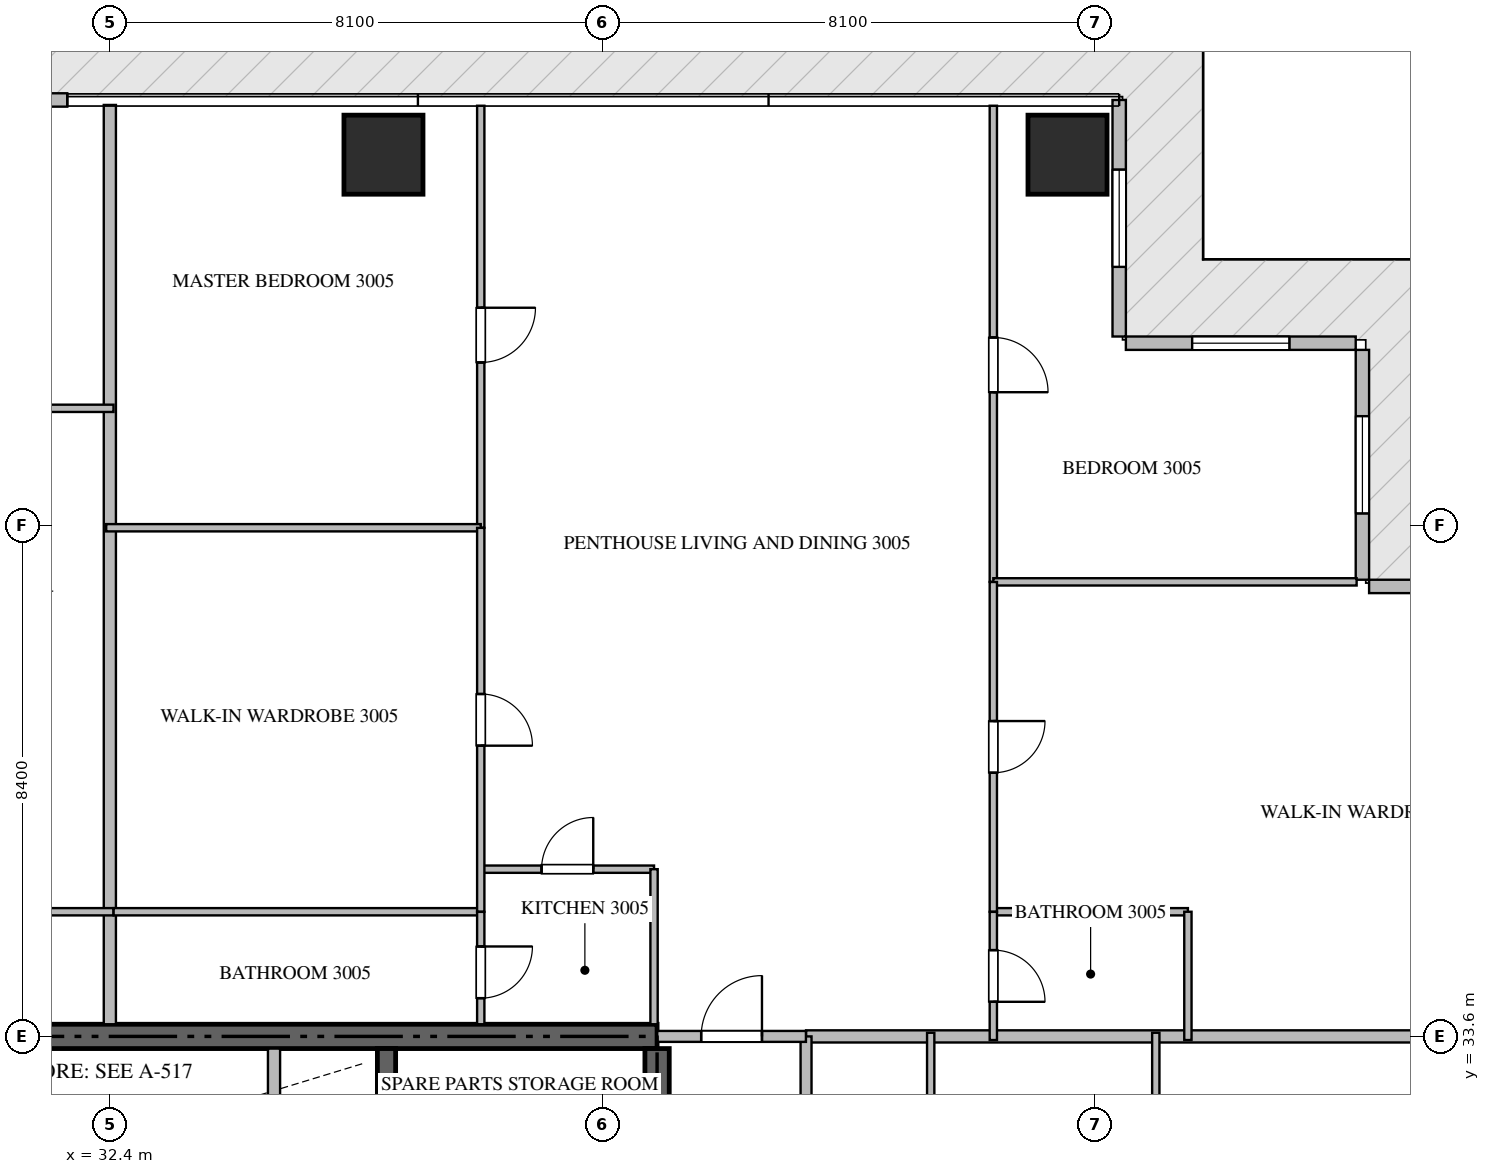
"""IFC4 building model, lengths in metres.
Left out: names, types, materials, properties, quantities, classifications, styles, units other than length and angle.
Written with IfcOpenShell. Run it as: python <this file> out.ifc"""

import sys

from ifc_helpers import new_model, si_unit, direction, frame, frame_2d, origin, origin_2d, place, context, subcontext, project, spatial, rectangle, extrude, source, transform, mapped, element, fill, save


model = new_model("IFC4")
c1 = context("Model", 3, precision=1e-05, world=origin(), true_north=direction((0.0, 1.0)))
c2 = subcontext(c1, "Body", "Model", "MODEL_VIEW")
j1 = project(units=[si_unit("LENGTHUNIT", "METRE"), si_unit("PLANEANGLEUNIT", "RADIAN")], contexts=[c1])
p1 = place(None, origin())
s1 = spatial("IfcSite", under=j1, at=p1, CompositionType="ELEMENT")
p2 = place(p1, origin())
s2 = spatial("IfcBuilding", under=s1, at=p2, CompositionType="ELEMENT")
p3 = place(p2, frame((0.0, 0.0, 123.9)))
s3 = spatial("IfcBuildingStorey", under=s2, at=p3, CompositionType="ELEMENT", Elevation=123.9)
p4 = place(p3, frame((41.4, 33.6, -0.26), z_axis=(0.0, 0.0, 1.0), x_axis=(-1.0, 0.0, 0.0)))
e1 = element("IfcWall", 1, at=p4, inside=s3, PredefinedType="SHEAR", context=c2, shape_type="SweptSolid", body=[
    extrude(rectangle(XDim=18.0, YDim=0.4, at=frame_2d((9.0, 0.0))), origin(), (0.0, 0.0, 1.0), 3.748),
])
p5 = place(p3, frame((41.4, 27.75, -0.26), z_axis=(0.0, 0.0, 1.0), x_axis=(0.0, 1.0, 0.0)))
e2 = element("IfcWall", 2, at=p5, inside=s3, PredefinedType="SHEAR", context=c2, shape_type="SweptSolid", body=[
    extrude(rectangle(XDim=5.65, YDim=0.4, at=frame_2d((2.825, 0.0))), origin(), (0.0, 0.0, 1.0), 3.748),
])
p6 = place(p3, frame((36.95, 27.05, -0.26), z_axis=(0.0, 0.0, 1.0), x_axis=(0.0, 1.0, 0.0)))
e3 = element("IfcWall", 3, at=p6, inside=s3, PredefinedType="SHEAR", context=c2, shape_type="SweptSolid", body=[
    extrude(rectangle(XDim=6.35, YDim=0.3, at=frame_2d((3.175, 0.0))), origin(), (0.0, 0.0, 1.0), 3.748),
])
m1 = source(origin(), c2, "Body", "SweptSolid", [
    extrude(rectangle(XDim=1.3, YDim=1.3, at=origin_2d()), origin(), (0.0, 0.0, 1.0), 3.75),
])
for number, where, z_axis, x_axis in (
    (4, (36.9, 48.1, -0.26), (0.0, 0.0, 1.0), (1.0, 0.0, 0.0)),
    (5, (48.15, 48.1, -0.26), (0.0, 0.0, 1.0), (1.0, 0.0, 0.0)),
):
    element("IfcColumn", number, at=place(p3, frame(where, z_axis=z_axis, x_axis=x_axis)), inside=s3, PredefinedType="COLUMN", context=c2, shape_type="MappedRepresentation", body=[
        mapped(m1, transform((0.0, 0.0, 0.0), scale=1.0)),
    ])
p7 = place(p3, frame((57.0, 41.0, 0.0), z_axis=(0.0, 0.0, 1.0), x_axis=(-1.0, 0.0, 0.0)))
e6 = element("IfcWall", 6, at=p7, inside=s3, PredefinedType="ELEMENTEDWALL", context=c2, shape_type="SweptSolid", body=[
    extrude(rectangle(XDim=3.89, YDim=0.22, at=frame_2d((1.945, 0.0))), origin(), (0.0, 0.0, 1.0), 3.475),
])
p8 = place(p7, frame((1.145, 0.0, 0.65)))
e7 = element("IfcOpeningElement", 7, at=p8, cuts=e6, PredefinedType="OPENING", context=c2, shape_type="SweptSolid", body=[
    extrude(rectangle(XDim=1.6, YDim=2.1, at=frame_2d((0.8, 1.05))), frame((0.0, 0.12, 0.0), z_axis=(0.0, -1.0, 0.0), x_axis=(1.0, 0.0, 0.0)), (0.0, 0.0, 1.0), 0.24),
])
p9 = place(p3, frame((53.0, 41.11, 0.0), z_axis=(0.0, 0.0, 1.0), x_axis=(0.0, 1.0, 0.0)))
e8 = element("IfcWall", 8, at=p9, inside=s3, PredefinedType="ELEMENTEDWALL", context=c2, shape_type="SweptSolid", body=[
    extrude(rectangle(XDim=3.78, YDim=0.22, at=frame_2d((1.89, 0.0))), origin(), (0.0, 0.0, 1.0), 3.475),
])
p10 = place(p9, frame((1.09, 0.0, 0.65)))
e9 = element("IfcOpeningElement", 9, at=p10, cuts=e8, PredefinedType="OPENING", context=c2, shape_type="SweptSolid", body=[
    extrude(rectangle(XDim=1.6, YDim=2.1, at=frame_2d((0.8, 1.05))), frame((0.0, 0.12, 0.0), z_axis=(0.0, -1.0, 0.0), x_axis=(1.0, 0.0, 0.0)), (0.0, 0.0, 1.0), 0.24),
])
p11 = place(p3, frame((52.89, 45.0, 0.0), z_axis=(0.0, 0.0, 1.0), x_axis=(-1.0, 0.0, 0.0)))
e10 = element("IfcWall", 10, at=p11, inside=s3, PredefinedType="ELEMENTEDWALL", context=c2, shape_type="SweptSolid", body=[
    extrude(rectangle(XDim=3.78, YDim=0.22, at=frame_2d((1.89, 0.0))), origin(), (0.0, 0.0, 1.0), 3.475),
])
p12 = place(p11, frame((1.09, 0.0, 0.65)))
e11 = element("IfcOpeningElement", 11, at=p12, cuts=e10, PredefinedType="OPENING", context=c2, shape_type="SweptSolid", body=[
    extrude(rectangle(XDim=1.6, YDim=2.1, at=frame_2d((0.8, 1.05))), frame((0.0, 0.12, 0.0), z_axis=(0.0, -1.0, 0.0), x_axis=(1.0, 0.0, 0.0)), (0.0, 0.0, 1.0), 0.24),
])
p13 = place(p3, frame((49.0, 45.11, 0.0), z_axis=(0.0, 0.0, 1.0), x_axis=(0.0, 1.0, 0.0)))
e12 = element("IfcWall", 12, at=p13, inside=s3, PredefinedType="ELEMENTEDWALL", context=c2, shape_type="SweptSolid", body=[
    extrude(rectangle(XDim=3.89, YDim=0.22, at=frame_2d((1.945, 0.0))), origin(), (0.0, 0.0, 1.0), 3.475),
])
p14 = place(p13, frame((1.145, 0.0, 0.65)))
e13 = element("IfcOpeningElement", 13, at=p14, cuts=e12, PredefinedType="OPENING", context=c2, shape_type="SweptSolid", body=[
    extrude(rectangle(XDim=1.6, YDim=2.1, at=frame_2d((0.8, 1.05))), frame((0.0, 0.12, 0.0), z_axis=(0.0, -1.0, 0.0), x_axis=(1.0, 0.0, 0.0)), (0.0, 0.0, 1.0), 0.24),
])
p15 = place(p3, frame((31.7, 49.0, 0.0), z_axis=(0.0, 0.0, 1.0), x_axis=(-1.0, 0.0, 0.0)))
e14 = element("IfcWall", 14, at=p15, inside=s3, PredefinedType="ELEMENTEDWALL", context=c2, shape_type="SweptSolid", body=[
    extrude(rectangle(XDim=3.0, YDim=0.22, at=frame_2d((1.5, 0.0))), origin(), (0.0, 0.0, 1.0), 3.475),
])
p16 = place(p15, frame((0.95, 0.0, 0.0)))
e15 = element("IfcOpeningElement", 15, at=p16, cuts=e14, PredefinedType="OPENING", context=c2, shape_type="SweptSolid", body=[
    extrude(rectangle(XDim=1.1, YDim=2.2, at=frame_2d((0.55, 1.1))), frame((0.0, 0.12, 0.0), z_axis=(0.0, -1.0, 0.0), x_axis=(1.0, 0.0, 0.0)), (0.0, 0.0, 1.0), 0.24),
])
p17 = place(p3, frame((35.1, 30.75, 0.0), z_axis=(0.0, 0.0, 1.0), x_axis=(0.0, 1.0, 0.0)))
e16 = element("IfcWall", 16, at=p17, inside=s3, PredefinedType="STANDARD", context=c2, shape_type="SweptSolid", body=[
    extrude(rectangle(XDim=2.65, YDim=0.2, at=frame_2d((1.325, 0.0))), origin(), (0.0, 0.0, 1.0), 3.49),
])
p18 = place(p3, frame((32.4, 33.8, 0.0), z_axis=(0.0, 0.0, 1.0), x_axis=(0.0, 1.0, 0.0)))
e17 = element("IfcWall", 17, at=p18, inside=s3, PredefinedType="PARTITIONING", context=c2, shape_type="SweptSolid", body=[
    extrude(rectangle(XDim=15.118, YDim=0.2, at=frame_2d((7.559, 0.0))), origin(), (0.0, 0.0, 1.0), 3.49),
])
p19 = place(p3, frame((43.85, 33.6, 0.0), z_axis=(0.0, 0.0, 1.0), x_axis=(1.0, 0.0, 0.0)))
e18 = element("IfcWall", 18, at=p19, inside=s3, PredefinedType="PARTITIONING", context=c2, shape_type="SweptSolid", body=[
    extrude(rectangle(XDim=13.068, YDim=0.2, at=frame_2d((6.534, 0.0))), origin(), (0.0, 0.0, 1.0), 3.49),
])
p20 = place(p3, frame((43.85, 14.9, 0.0), z_axis=(0.0, 0.0, 1.0), x_axis=(0.0, 1.0, 0.0)))
e19 = element("IfcWall", 19, at=p20, inside=s3, PredefinedType="PARTITIONING", context=c2, shape_type="SweptSolid", body=[
    extrude(rectangle(XDim=18.7, YDim=0.18, at=frame_2d((9.35, 0.0))), origin(), (0.0, 0.0, 1.0), 3.49),
])
p21 = place(p20, frame((1.805, 0.0, 0.0)))
e20 = element("IfcOpeningElement", 20, at=p21, cuts=e19, PredefinedType="OPENING", context=c2, shape_type="SweptSolid", body=[
    extrude(rectangle(XDim=1.0, YDim=2.15, at=frame_2d((0.5, 1.075))), frame((0.0, 0.1, 0.0), z_axis=(0.0, -1.0, 0.0), x_axis=(1.0, 0.0, 0.0)), (0.0, 0.0, 1.0), 0.2),
])
p22 = place(p20, frame((10.602, 0.0, 0.0)))
e21 = element("IfcOpeningElement", 21, at=p22, cuts=e19, PredefinedType="OPENING", context=c2, shape_type="SweptSolid", body=[
    extrude(rectangle(XDim=1.0, YDim=2.15, at=frame_2d((0.5, 1.075))), frame((0.0, 0.1, 0.0), z_axis=(0.0, -1.0, 0.0), x_axis=(1.0, 0.0, 0.0)), (0.0, 0.0, 1.0), 0.2),
])
p23 = place(p3, frame((41.402, 33.6, 0.0), z_axis=(0.0, 0.0, 1.0), x_axis=(1.0, 0.0, 0.0)))
e22 = element("IfcWall", 22, at=p23, inside=s3, PredefinedType="PARTITIONING", context=c2, shape_type="SweptSolid", body=[
    extrude(rectangle(XDim=2.446, YDim=0.18, at=frame_2d((1.223, 0.0))), origin(), (0.0, 0.0, 1.0), 3.49),
])
p24 = place(p23, frame((0.723, 0.0, 0.0)))
e23 = element("IfcOpeningElement", 23, at=p24, cuts=e22, PredefinedType="OPENING", context=c2, shape_type="SweptSolid", body=[
    extrude(rectangle(XDim=1.0, YDim=2.15, at=frame_2d((0.5, 1.075))), frame((0.0, 0.1, 0.0), z_axis=(0.0, -1.0, 0.0), x_axis=(1.0, 0.0, 0.0)), (0.0, 0.0, 1.0), 0.2),
])
for number, where, z_axis, x_axis in (
    (24, (26.3, 43.929, 0.0), (0.0, 0.0, 1.0), (1.0, 0.0, 0.0)),
    (25, (26.3, 35.65, 0.0), (0.0, 0.0, 1.0), (1.0, 0.0, 0.0)),
):
    element("IfcWall", number, at=place(p3, frame(where, z_axis=z_axis, x_axis=x_axis)), inside=s3, PredefinedType="PARTITIONING", context=c2, shape_type="SweptSolid", body=[
        extrude(rectangle(XDim=6.16, YDim=0.12, at=frame_2d((3.08, 0.0))), origin(), (0.0, 0.0, 1.0), 3.49),
    ])
p25 = place(p3, frame((38.5, 36.35, 0.0), z_axis=(0.0, 0.0, 1.0), x_axis=(1.0, 0.0, 0.0)))
e26 = element("IfcWall", 26, at=p25, inside=s3, PredefinedType="PARTITIONING", context=c2, shape_type="SweptSolid", body=[
    extrude(rectangle(XDim=2.85, YDim=0.12, at=frame_2d((1.425, 0.0))), origin(), (0.0, 0.0, 1.0), 3.49),
])
p26 = place(p25, frame((1.0, 0.0, 0.0)))
e27 = element("IfcOpeningElement", 27, at=p26, cuts=e26, PredefinedType="OPENING", context=c2, shape_type="SweptSolid", body=[
    extrude(rectangle(XDim=0.85, YDim=2.1, at=frame_2d((0.425, 1.05))), frame((0.0, 0.07, 0.0), z_axis=(0.0, -1.0, 0.0), x_axis=(1.0, 0.0, 0.0)), (0.0, 0.0, 1.0), 0.14),
])
p27 = place(p3, frame((41.35, 36.35, 0.0), z_axis=(0.0, 0.0, 1.0), x_axis=(0.0, -1.0, 0.0)))
e28 = element("IfcWall", 28, at=p27, inside=s3, PredefinedType="PARTITIONING", context=c2, shape_type="SweptSolid", body=[
    extrude(rectangle(XDim=2.55, YDim=0.12, at=frame_2d((1.275, 0.0))), origin(), (0.0, 0.0, 1.0), 3.49),
])
p28 = place(p3, frame((38.5, 48.905, 0.0), z_axis=(0.0, 0.0, 1.0), x_axis=(0.0, -1.0, 0.0)))
e29 = element("IfcWall", 29, at=p28, inside=s3, PredefinedType="PARTITIONING", context=c2, shape_type="SweptSolid", body=[
    extrude(rectangle(XDim=6.94, YDim=0.12, at=frame_2d((3.47, 0.0))), origin(), (0.0, 0.0, 1.0), 3.49),
])
p29 = place(p28, frame((3.322, 0.0, 0.0)))
e30 = element("IfcOpeningElement", 30, at=p29, cuts=e29, PredefinedType="OPENING", context=c2, shape_type="SweptSolid", body=[
    extrude(rectangle(XDim=0.9, YDim=2.1, at=frame_2d((0.45, 1.05))), frame((0.0, 0.07, 0.0), z_axis=(0.0, -1.0, 0.0), x_axis=(1.0, 0.0, 0.0)), (0.0, 0.0, 1.0), 0.14),
])
p30 = place(p3, frame((32.34, 41.965, 0.0), z_axis=(0.0, 0.0, 1.0), x_axis=(1.0, 0.0, 0.0)))
e31 = element("IfcWall", 31, at=p30, inside=s3, PredefinedType="PARTITIONING", context=c2, shape_type="SweptSolid", body=[
    extrude(rectangle(XDim=6.16, YDim=0.12, at=frame_2d((3.08, 0.0))), origin(), (0.0, 0.0, 1.0), 3.49),
])
p31 = place(p3, frame((32.462, 35.65, 0.0), z_axis=(0.0, 0.0, 1.0), x_axis=(1.0, 0.0, 0.0)))
e32 = element("IfcWall", 32, at=p31, inside=s3, PredefinedType="PARTITIONING", context=c2, shape_type="SweptSolid", body=[
    extrude(rectangle(XDim=6.038, YDim=0.12, at=frame_2d((3.019, 0.0))), origin(), (0.0, 0.0, 1.0), 3.49),
])
p32 = place(p3, frame((38.5, 41.963, 0.0), z_axis=(0.0, 0.0, 1.0), x_axis=(0.0, -1.0, 0.0)))
e33 = element("IfcWall", 33, at=p32, inside=s3, PredefinedType="PARTITIONING", context=c2, shape_type="SweptSolid", body=[
    extrude(rectangle(XDim=6.313, YDim=0.12, at=frame_2d((3.156, 0.0))), origin(), (0.0, 0.0, 1.0), 3.49),
])
p33 = place(p32, frame((2.732, 0.0, 0.0)))
e34 = element("IfcOpeningElement", 34, at=p33, cuts=e33, PredefinedType="OPENING", context=c2, shape_type="SweptSolid", body=[
    extrude(rectangle(XDim=0.85, YDim=2.1, at=frame_2d((0.425, 1.05))), frame((0.0, 0.07, 0.0), z_axis=(0.0, -1.0, 0.0), x_axis=(1.0, 0.0, 0.0)), (0.0, 0.0, 1.0), 0.14),
])
p34 = place(p3, frame((38.5, 35.648, 0.0), z_axis=(0.0, 0.0, 1.0), x_axis=(0.0, -1.0, 0.0)))
e35 = element("IfcWall", 35, at=p34, inside=s3, PredefinedType="PARTITIONING", context=c2, shape_type="SweptSolid", body=[
    extrude(rectangle(XDim=1.848, YDim=0.12, at=frame_2d((0.924, 0.0))), origin(), (0.0, 0.0, 1.0), 3.49),
])
p35 = place(p34, frame((0.569, 0.0, 0.0)))
e36 = element("IfcOpeningElement", 36, at=p35, cuts=e35, PredefinedType="OPENING", context=c2, shape_type="SweptSolid", body=[
    extrude(rectangle(XDim=0.85, YDim=2.1, at=frame_2d((0.425, 1.05))), frame((0.0, 0.07, 0.0), z_axis=(0.0, -1.0, 0.0), x_axis=(1.0, 0.0, 0.0)), (0.0, 0.0, 1.0), 0.14),
])
p36 = place(p3, frame((46.93, 48.905, 0.0), z_axis=(0.0, 0.0, 1.0), x_axis=(0.0, -1.0, 0.0)))
e37 = element("IfcWall", 37, at=p36, inside=s3, PredefinedType="PARTITIONING", context=c2, shape_type="SweptSolid", body=[
    extrude(rectangle(XDim=7.83, YDim=0.12, at=frame_2d((3.915, 0.0))), origin(), (0.0, 0.0, 1.0), 3.49),
])
p37 = place(p36, frame((3.811, 0.0, 0.0)))
e38 = element("IfcOpeningElement", 38, at=p37, cuts=e37, PredefinedType="OPENING", context=c2, shape_type="SweptSolid", body=[
    extrude(rectangle(XDim=0.9, YDim=2.1, at=frame_2d((0.45, 1.05))), frame((0.0, 0.07, 0.0), z_axis=(0.0, -1.0, 0.0), x_axis=(1.0, 0.0, 0.0)), (0.0, 0.0, 1.0), 0.14),
])
p38 = place(p3, frame((46.93, 41.075, 0.0), z_axis=(0.0, 0.0, 1.0), x_axis=(1.0, 0.0, 0.0)))
e39 = element("IfcWall", 39, at=p38, inside=s3, PredefinedType="PARTITIONING", context=c2, shape_type="SweptSolid", body=[
    extrude(rectangle(XDim=5.975, YDim=0.12, at=frame_2d((2.988, 0.0))), origin(), (0.0, 0.0, 1.0), 3.49),
])
p39 = place(p3, frame((46.93, 35.65, 0.0), z_axis=(0.0, 0.0, 1.0), x_axis=(1.0, 0.0, 0.0)))
e40 = element("IfcWall", 40, at=p39, inside=s3, PredefinedType="PARTITIONING", context=c2, shape_type="SweptSolid", body=[
    extrude(rectangle(XDim=3.2, YDim=0.12, at=frame_2d((1.6, 0.0))), origin(), (0.0, 0.0, 1.0), 3.49),
])
p40 = place(p3, frame((50.13, 35.65, 0.0), z_axis=(0.0, 0.0, 1.0), x_axis=(0.0, -1.0, 0.0)))
e41 = element("IfcWall", 41, at=p40, inside=s3, PredefinedType="PARTITIONING", context=c2, shape_type="SweptSolid", body=[
    extrude(rectangle(XDim=2.11, YDim=0.12, at=frame_2d((1.055, 0.0))), origin(), (0.0, 0.0, 1.0), 3.49),
])
p41 = place(p3, frame((46.93, 41.073, 0.0), z_axis=(0.0, 0.0, 1.0), x_axis=(0.0, -1.0, 0.0)))
e42 = element("IfcWall", 42, at=p41, inside=s3, PredefinedType="PARTITIONING", context=c2, shape_type="SweptSolid", body=[
    extrude(rectangle(XDim=5.423, YDim=0.12, at=frame_2d((2.711, 0.0))), origin(), (0.0, 0.0, 1.0), 3.49),
])
p42 = place(p41, frame((2.287, 0.0, 0.0)))
e43 = element("IfcOpeningElement", 43, at=p42, cuts=e42, PredefinedType="OPENING", context=c2, shape_type="SweptSolid", body=[
    extrude(rectangle(XDim=0.85, YDim=2.1, at=frame_2d((0.425, 1.05))), frame((0.0, 0.07, 0.0), z_axis=(0.0, -1.0, 0.0), x_axis=(1.0, 0.0, 0.0)), (0.0, 0.0, 1.0), 0.14),
])
p43 = place(p3, frame((46.93, 35.648, 0.0), z_axis=(0.0, 0.0, 1.0), x_axis=(0.0, -1.0, 0.0)))
e44 = element("IfcWall", 44, at=p43, inside=s3, PredefinedType="PARTITIONING", context=c2, shape_type="SweptSolid", body=[
    extrude(rectangle(XDim=2.108, YDim=0.12, at=frame_2d((1.054, 0.0))), origin(), (0.0, 0.0, 1.0), 3.49),
])
p44 = place(p43, frame((0.629, 0.0, 0.0)))
e45 = element("IfcOpeningElement", 45, at=p44, cuts=e44, PredefinedType="OPENING", context=c2, shape_type="SweptSolid", body=[
    extrude(rectangle(XDim=0.85, YDim=2.1, at=frame_2d((0.425, 1.05))), frame((0.0, 0.07, 0.0), z_axis=(0.0, -1.0, 0.0), x_axis=(1.0, 0.0, 0.0)), (0.0, 0.0, 1.0), 0.14),
])
for number, where, z_axis, x_axis in (
    (46, (49.602, 27.8, 0.0), (0.0, 0.0, 1.0), (0.0, 1.0, 0.0)),
    (47, (45.9, 27.8, 0.0), (0.0, 0.0, 1.0), (0.0, 1.0, 0.0)),
):
    element("IfcWall", number, at=place(p3, frame(where, z_axis=z_axis, x_axis=x_axis)), inside=s3, PredefinedType="PARTITIONING", context=c2, shape_type="SweptSolid", body=[
        extrude(rectangle(XDim=5.86, YDim=0.12, at=frame_2d((2.93, 0.0))), origin(), (0.0, 0.0, 1.0), 3.49),
    ])
m2 = source(origin(), c2, "Body", "SweptSolid", [
    extrude(rectangle(XDim=1.6, YDim=2.1, at=frame_2d((0.8, 1.05))), frame((0.0, 0.03, 0.0), z_axis=(0.0, -1.0, 0.0), x_axis=(1.0, 0.0, 0.0)), (0.0, 0.0, 1.0), 0.06),
])
p45 = place(p10, origin())
e48 = element("IfcWindow", 48, at=p45, inside=s3, PartitioningType="SINGLE_PANEL", PredefinedType="WINDOW", context=c2, shape_type="MappedRepresentation", body=[
    mapped(m2, transform((0.0, 0.0, 0.0), scale=1.0)),
])
fill(e9, e48)
p46 = place(p12, origin())
e49 = element("IfcWindow", 49, at=p46, inside=s3, PartitioningType="SINGLE_PANEL", PredefinedType="WINDOW", context=c2, shape_type="MappedRepresentation", body=[
    mapped(m2, transform((0.0, 0.0, 0.0), scale=1.0)),
])
fill(e11, e49)
p47 = place(p14, origin())
e50 = element("IfcWindow", 50, at=p47, inside=s3, PartitioningType="SINGLE_PANEL", PredefinedType="WINDOW", context=c2, shape_type="MappedRepresentation", body=[
    mapped(m2, transform((0.0, 0.0, 0.0), scale=1.0)),
])
fill(e13, e50)
m3 = source(origin(), c2, "Body", "SweptSolid", [
    extrude(rectangle(XDim=1.0, YDim=2.15, at=frame_2d((0.5, 1.075))), frame((0.0, 0.025, 0.0), z_axis=(0.0, -1.0, 0.0), x_axis=(1.0, 0.0, 0.0)), (0.0, 0.0, 1.0), 0.05),
])
p48 = place(p24, origin())
e51 = element("IfcDoor", 51, at=p48, inside=s3, OperationType="SINGLE_SWING_RIGHT", PredefinedType="DOOR", context=c2, shape_type="MappedRepresentation", body=[
    mapped(m3, transform((0.0, 0.0, 0.0), scale=1.0)),
])
fill(e23, e51)
m4 = source(origin(), c2, "Body", "SweptSolid", [
    extrude(rectangle(XDim=0.85, YDim=2.1, at=frame_2d((0.425, 1.05))), frame((0.0, 0.025, 0.0), z_axis=(0.0, -1.0, 0.0), x_axis=(1.0, 0.0, 0.0)), (0.0, 0.0, 1.0), 0.05),
])
p49 = place(p26, origin())
e52 = element("IfcDoor", 52, at=p49, inside=s3, OperationType="SINGLE_SWING_RIGHT", PredefinedType="DOOR", context=c2, shape_type="MappedRepresentation", body=[
    mapped(m4, transform((0.0, 0.0, 0.0), scale=1.0)),
])
fill(e27, e52)
m5 = source(origin(), c2, "Body", "SweptSolid", [
    extrude(rectangle(XDim=0.9, YDim=2.1, at=frame_2d((0.45, 1.05))), frame((0.0, 0.025, 0.0), z_axis=(0.0, -1.0, 0.0), x_axis=(1.0, 0.0, 0.0)), (0.0, 0.0, 1.0), 0.05),
])
p50 = place(p29, origin())
e53 = element("IfcDoor", 53, at=p50, inside=s3, OperationType="SINGLE_SWING_LEFT", PredefinedType="DOOR", context=c2, shape_type="MappedRepresentation", body=[
    mapped(m5, transform((0.0, 0.0, 0.0), scale=1.0)),
])
fill(e30, e53)
p51 = place(p33, origin())
e54 = element("IfcDoor", 54, at=p51, inside=s3, OperationType="SINGLE_SWING_RIGHT", PredefinedType="DOOR", context=c2, shape_type="MappedRepresentation", body=[
    mapped(m4, transform((0.0, 0.0, 0.0), scale=1.0)),
])
fill(e34, e54)
p52 = place(p35, origin())
e55 = element("IfcDoor", 55, at=p52, inside=s3, OperationType="SINGLE_SWING_LEFT", PredefinedType="DOOR", context=c2, shape_type="MappedRepresentation", body=[
    mapped(m4, transform((0.0, 0.0, 0.0), scale=1.0)),
])
fill(e36, e55)
p53 = place(p37, origin())
e56 = element("IfcDoor", 56, at=p53, inside=s3, OperationType="SINGLE_SWING_RIGHT", PredefinedType="DOOR", context=c2, shape_type="MappedRepresentation", body=[
    mapped(m5, transform((0.0, 0.0, 0.0), scale=1.0)),
])
fill(e38, e56)
p54 = place(p42, origin())
e57 = element("IfcDoor", 57, at=p54, inside=s3, OperationType="SINGLE_SWING_LEFT", PredefinedType="DOOR", context=c2, shape_type="MappedRepresentation", body=[
    mapped(m4, transform((0.0, 0.0, 0.0), scale=1.0)),
])
fill(e43, e57)
p55 = place(p44, origin())
e58 = element("IfcDoor", 58, at=p55, inside=s3, OperationType="SINGLE_SWING_RIGHT", PredefinedType="DOOR", context=c2, shape_type="MappedRepresentation", body=[
    mapped(m4, transform((0.0, 0.0, 0.0), scale=1.0)),
])
fill(e45, e58)
save(model, sys.argv[1])
